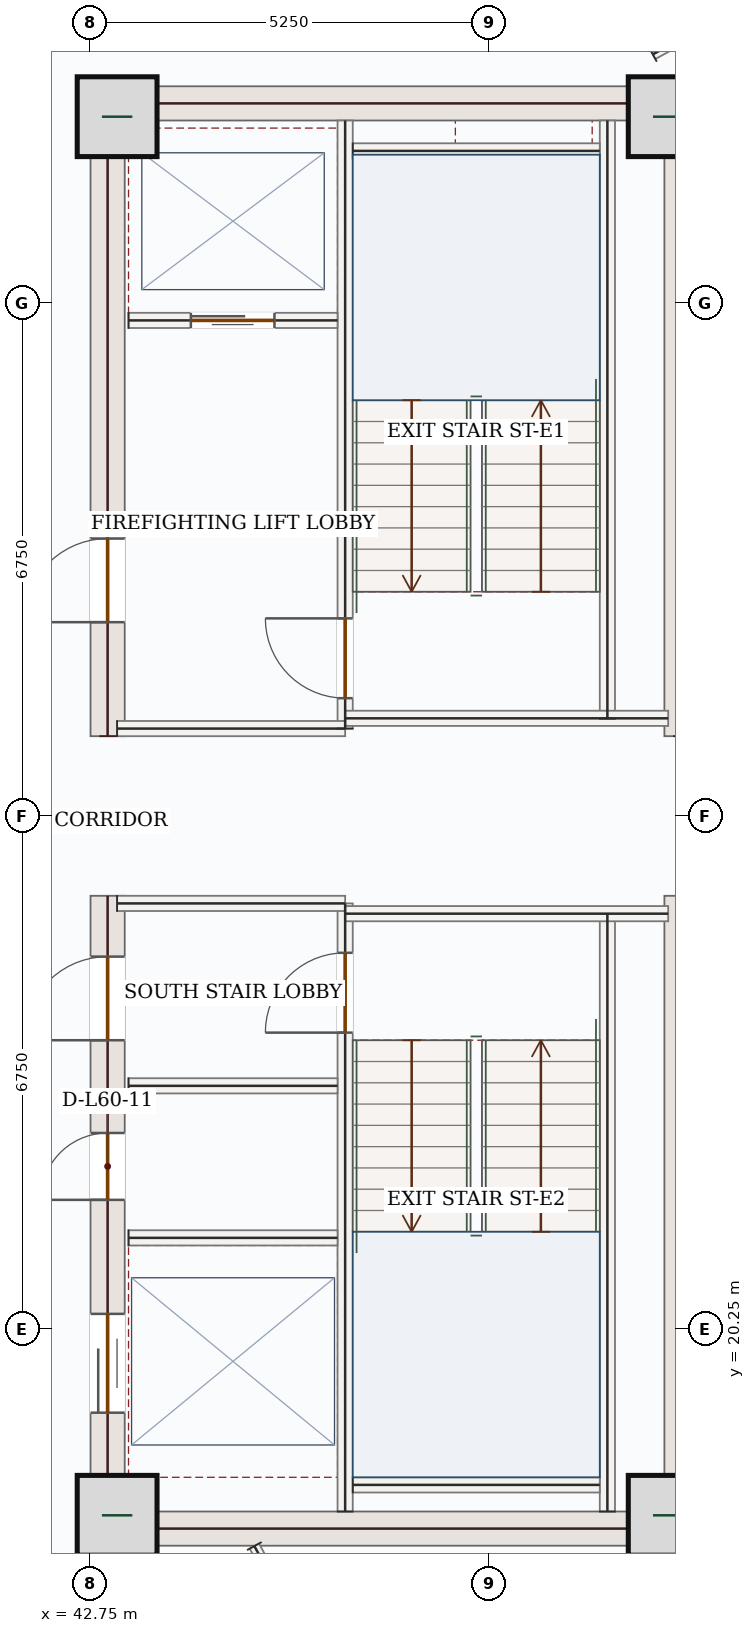
"""IFC4 building model, lengths in metres.
Left out: names, types, materials, properties, quantities, classifications, styles, units other than length and angle.
Written with IfcOpenShell. Run it as: python <this file> out.ifc"""

import sys

from ifc_helpers import new_model, si_unit, direction, frame, frame_2d, origin, origin_2d, place, context, subcontext, project, spatial, rectangle, extrude, source, transform, mapped, element, fill, save


model = new_model("IFC4")
c1 = context("Model", 3, precision=1e-05, world=origin(), true_north=direction((0.0, 1.0)))
c2 = subcontext(c1, "Body", "Model", "MODEL_VIEW")
j1 = project(units=[si_unit("LENGTHUNIT", "METRE"), si_unit("PLANEANGLEUNIT", "RADIAN")], contexts=[c1])
p1 = place(None, origin())
s1 = spatial("IfcSite", under=j1, at=p1, CompositionType="ELEMENT")
p2 = place(p1, origin())
s2 = spatial("IfcBuilding", under=s1, at=p2, CompositionType="ELEMENT")
p3 = place(p2, frame((0.0, 0.0, 254.1)))
s3 = spatial("IfcBuildingStorey", under=s2, at=p3, CompositionType="ELEMENT", Elevation=254.1)
p4 = place(p3, frame((42.975, 17.4, 0.0), z_axis=(0.0, 0.0, 1.0), x_axis=(0.0, 1.0, 0.0)))
e1 = element("IfcWall", 1, at=p4, inside=s3, PredefinedType="SHEAR", context=c2, shape_type="SweptSolid", body=[
    extrude(rectangle(XDim=8.55, YDim=0.45, at=frame_2d((4.275, 0.0))), origin(), (0.0, 0.0, 1.0), 3.5),
])
p5 = place(p4, frame((6.65, 0.0, 0.0)))
e2 = element("IfcOpeningElement", 2, at=p5, cuts=e1, PredefinedType="OPENING", context=c2, shape_type="SweptSolid", body=[
    extrude(rectangle(XDim=1.1, YDim=2.2, at=frame_2d((0.55, 1.1))), frame((0.0, 0.235, 0.0), z_axis=(0.0, -1.0, 0.0), x_axis=(1.0, 0.0, 0.0)), (0.0, 0.0, 1.0), 0.47),
])
p6 = place(p4, frame((1.75, 0.0, 0.0)))
e3 = element("IfcOpeningElement", 3, at=p6, cuts=e1, PredefinedType="OPENING", context=c2, shape_type="SweptSolid", body=[
    extrude(rectangle(XDim=1.3, YDim=2.2, at=frame_2d((0.65, 1.1))), frame((0.0, 0.235, 0.0), z_axis=(0.0, -1.0, 0.0), x_axis=(1.0, 0.0, 0.0)), (0.0, 0.0, 1.0), 0.47),
])
p7 = place(p4, frame((4.55, 0.0, 0.0)))
e4 = element("IfcOpeningElement", 4, at=p7, cuts=e1, PredefinedType="OPENING", context=c2, shape_type="SweptSolid", body=[
    extrude(rectangle(XDim=0.88, YDim=2.1, at=frame_2d((0.44, 1.05))), frame((0.0, 0.235, 0.0), z_axis=(0.0, -1.0, 0.0), x_axis=(1.0, 0.0, 0.0)), (0.0, 0.0, 1.0), 0.47),
])
p8 = place(p3, frame((42.975, 28.05, 0.0), z_axis=(0.0, 0.0, 1.0), x_axis=(0.0, 1.0, 0.0)))
e5 = element("IfcWall", 5, at=p8, inside=s3, PredefinedType="SHEAR", context=c2, shape_type="SweptSolid", body=[
    extrude(rectangle(XDim=8.55, YDim=0.45, at=frame_2d((4.275, 0.0))), origin(), (0.0, 0.0, 1.0), 3.5),
])
p9 = place(p8, frame((1.5, 0.0, 0.0)))
e6 = element("IfcOpeningElement", 6, at=p9, cuts=e5, PredefinedType="OPENING", context=c2, shape_type="SweptSolid", body=[
    extrude(rectangle(XDim=1.1, YDim=2.2, at=frame_2d((0.55, 1.1))), frame((0.0, 0.235, 0.0), z_axis=(0.0, -1.0, 0.0), x_axis=(1.0, 0.0, 0.0)), (0.0, 0.0, 1.0), 0.47),
])
m1 = source(origin(), c2, "Body", "SweptSolid", [
    extrude(rectangle(XDim=8.55, YDim=0.45, at=frame_2d((4.275, 0.0))), origin(), (0.0, 0.0, 1.0), 3.5),
])
for number, where, z_axis, x_axis in (
    (7, (50.525, 17.4, 0.0), (0.0, 0.0, 1.0), (0.0, 1.0, 0.0)),
    (8, (50.525, 28.05, 0.0), (0.0, 0.0, 1.0), (0.0, 1.0, 0.0)),
):
    element("IfcWall", number, at=place(p3, frame(where, z_axis=z_axis, x_axis=x_axis)), inside=s3, PredefinedType="SHEAR", context=c2, shape_type="MappedRepresentation", body=[
        mapped(m1, transform((0.0, 0.0, 0.0), x_axis=(1.0, 0.0, 0.0), y_axis=(0.0, 1.0, 0.0), z_axis=(0.0, 0.0, 1.0), scale=1.0)),
    ])
m2 = source(origin(), c2, "Body", "SweptSolid", [
    extrude(rectangle(XDim=7.1, YDim=0.45, at=frame_2d((3.55, 0.0))), origin(), (0.0, 0.0, 1.0), 3.5),
])
for number, where, z_axis, x_axis in (
    (9, (43.2, 17.625, 0.0), (0.0, 0.0, 1.0), (1.0, 0.0, 0.0)),
    (10, (43.2, 36.375, 0.0), (0.0, 0.0, 1.0), (1.0, 0.0, 0.0)),
):
    element("IfcWall", number, at=place(p3, frame(where, z_axis=z_axis, x_axis=x_axis)), inside=s3, PredefinedType="SHEAR", context=c2, shape_type="MappedRepresentation", body=[
        mapped(m2, transform((0.0, 0.0, 0.0), x_axis=(1.0, 0.0, 0.0), y_axis=(0.0, 1.0, 0.0), z_axis=(0.0, 0.0, 1.0), scale=1.0)),
    ])
m3 = source(origin(), c2, "Body", "SweptSolid", [
    extrude(rectangle(XDim=1.05, YDim=1.05, at=origin_2d()), origin(), (0.0, 0.0, 1.0), 3.75),
])
for number, where, z_axis, x_axis in (
    (11, (43.1, 17.8, 0.0), (0.0, 0.0, 1.0), (1.0, 0.0, 0.0)),
    (12, (50.35, 17.8, 0.0), (0.0, 0.0, 1.0), (1.0, 0.0, 0.0)),
    (13, (43.1, 36.2, 0.0), (0.0, 0.0, 1.0), (1.0, 0.0, 0.0)),
    (14, (50.35, 36.2, 0.0), (0.0, 0.0, 1.0), (1.0, 0.0, 0.0)),
):
    element("IfcColumn", number, at=place(p3, frame(where, z_axis=z_axis, x_axis=x_axis)), inside=s3, PredefinedType="COLUMN", context=c2, shape_type="MappedRepresentation", body=[
        mapped(m3, transform((0.0, 0.0, 0.0), x_axis=(1.0, 0.0, 0.0), y_axis=(0.0, 1.0, 0.0), z_axis=(0.0, 0.0, 1.0), scale=1.0)),
    ])
p10 = place(p3, frame((53.06, 18.458, 0.0), z_axis=(0.0, 0.0, 1.0), x_axis=(-0.707106781187, -0.707106781187, 0.0)))
e15 = element("IfcWall", 15, at=p10, inside=s3, PredefinedType="SOLIDWALL", context=c2, shape_type="SweptSolid", body=[
    extrude(rectangle(XDim=4.394, YDim=0.28, at=frame_2d((2.197, 0.0))), origin(), (0.0, 0.0, 1.0), 3.5),
])
p11 = place(p10, frame((1.447, 0.0, 0.85)))
e16 = element("IfcOpeningElement", 16, at=p11, cuts=e15, PredefinedType="OPENING", context=c2, shape_type="SweptSolid", body=[
    extrude(rectangle(XDim=1.5, YDim=1.5, at=frame_2d((0.75, 0.75))), frame((0.0, 0.15, 0.0), z_axis=(0.0, -1.0, 0.0), x_axis=(1.0, 0.0, 0.0)), (0.0, 0.0, 1.0), 0.3),
])
m4 = source(origin(), c2, "Body", "SweptSolid", [
    extrude(rectangle(XDim=7.87, YDim=0.2, at=frame_2d((3.935, 0.0))), origin(), (0.0, 0.0, 1.0), 3.5),
])
for number, where, z_axis, x_axis in (
    (17, (49.55, 17.85, 0.0), (0.0, 0.0, 1.0), (0.0, 1.0, 0.0)),
    (18, (49.55, 28.28, 0.0), (0.0, 0.0, 1.0), (0.0, 1.0, 0.0)),
):
    element("IfcWall", number, at=place(p3, frame(where, z_axis=z_axis, x_axis=x_axis)), inside=s3, PredefinedType="SOLIDWALL", context=c2, shape_type="MappedRepresentation", body=[
        mapped(m4, transform((0.0, 0.0, 0.0), x_axis=(1.0, 0.0, 0.0), y_axis=(0.0, 1.0, 0.0), z_axis=(0.0, 0.0, 1.0), scale=1.0)),
    ])
p12 = place(p3, frame((46.1, 17.85, 0.0), z_axis=(0.0, 0.0, 1.0), x_axis=(0.0, 1.0, 0.0)))
e19 = element("IfcWall", 19, at=p12, inside=s3, PredefinedType="SOLIDWALL", context=c2, shape_type="SweptSolid", body=[
    extrude(rectangle(XDim=8.0, YDim=0.2, at=frame_2d((4.0, 0.0))), origin(), (0.0, 0.0, 1.0), 3.5),
])
p13 = place(p12, frame((6.3, 0.0, 0.0)))
e20 = element("IfcOpeningElement", 20, at=p13, cuts=e19, PredefinedType="OPENING", context=c2, shape_type="SweptSolid", body=[
    extrude(rectangle(XDim=1.05, YDim=2.15, at=frame_2d((0.525, 1.075))), frame((0.0, 0.11, 0.0), z_axis=(0.0, -1.0, 0.0), x_axis=(1.0, 0.0, 0.0)), (0.0, 0.0, 1.0), 0.22),
])
p14 = place(p3, frame((46.1, 28.15, 0.0), z_axis=(0.0, 0.0, 1.0), x_axis=(0.0, 1.0, 0.0)))
e21 = element("IfcWall", 21, at=p14, inside=s3, PredefinedType="SOLIDWALL", context=c2, shape_type="SweptSolid", body=[
    extrude(rectangle(XDim=8.0, YDim=0.2, at=frame_2d((4.0, 0.0))), origin(), (0.0, 0.0, 1.0), 3.5),
])
p15 = place(p14, frame((0.4, 0.0, 0.0)))
e22 = element("IfcOpeningElement", 22, at=p15, cuts=e21, PredefinedType="OPENING", context=c2, shape_type="SweptSolid", body=[
    extrude(rectangle(XDim=1.05, YDim=2.15, at=frame_2d((0.525, 1.075))), frame((0.0, 0.11, 0.0), z_axis=(0.0, -1.0, 0.0), x_axis=(1.0, 0.0, 0.0)), (0.0, 0.0, 1.0), 0.22),
])
m5 = source(origin(), c2, "Body", "SweptSolid", [
    extrude(rectangle(XDim=3.0, YDim=0.2, at=frame_2d((1.5, 0.0))), origin(), (0.0, 0.0, 1.0), 3.5),
])
p16 = place(p3, frame((43.1, 25.85, 0.0), z_axis=(0.0, 0.0, 1.0), x_axis=(1.0, 0.0, 0.0)))
e23 = element("IfcWall", 23, at=p16, inside=s3, PredefinedType="SOLIDWALL", context=c2, shape_type="MappedRepresentation", body=[
    mapped(m5, transform((0.0, 0.0, 0.0), x_axis=(1.0, 0.0, 0.0), y_axis=(0.0, 1.0, 0.0), z_axis=(0.0, 0.0, 1.0), scale=1.0)),
])
m6 = source(origin(), c2, "Body", "SweptSolid", [
    extrude(rectangle(XDim=4.25, YDim=0.2, at=frame_2d((2.125, 0.0))), origin(), (0.0, 0.0, 1.0), 3.5),
])
p17 = place(p3, frame((46.1, 25.715, 0.0), z_axis=(0.0, 0.0, 1.0), x_axis=(1.0, 0.0, 0.0)))
e24 = element("IfcWall", 24, at=p17, inside=s3, PredefinedType="SOLIDWALL", context=c2, shape_type="MappedRepresentation", body=[
    mapped(m6, transform((0.0, 0.0, 0.0), x_axis=(1.0, 0.0, 0.0), y_axis=(0.0, 1.0, 0.0), z_axis=(0.0, 0.0, 1.0), scale=1.0)),
])
p18 = place(p3, frame((43.1, 28.15, 0.0), z_axis=(0.0, 0.0, 1.0), x_axis=(1.0, 0.0, 0.0)))
e25 = element("IfcWall", 25, at=p18, inside=s3, PredefinedType="SOLIDWALL", context=c2, shape_type="MappedRepresentation", body=[
    mapped(m5, transform((0.0, 0.0, 0.0), x_axis=(1.0, 0.0, 0.0), y_axis=(0.0, 1.0, 0.0), z_axis=(0.0, 0.0, 1.0), scale=1.0)),
])
p19 = place(p3, frame((46.1, 28.285, 0.0), z_axis=(0.0, 0.0, 1.0), x_axis=(1.0, 0.0, 0.0)))
e26 = element("IfcWall", 26, at=p19, inside=s3, PredefinedType="SOLIDWALL", context=c2, shape_type="MappedRepresentation", body=[
    mapped(m6, transform((0.0, 0.0, 0.0), x_axis=(1.0, 0.0, 0.0), y_axis=(0.0, 1.0, 0.0), z_axis=(0.0, 0.0, 1.0), scale=1.0)),
])
m7 = source(origin(), c2, "Body", "SweptSolid", [
    extrude(rectangle(XDim=3.25, YDim=0.2, at=frame_2d((1.625, 0.0))), origin(), (0.0, 0.0, 1.0), 3.5),
])
for number, where, z_axis, x_axis in (
    (27, (46.2, 35.75, 0.0), (0.0, 0.0, 1.0), (1.0, 0.0, 0.0)),
    (28, (46.2, 18.2, 0.0), (0.0, 0.0, 1.0), (1.0, 0.0, 0.0)),
):
    element("IfcWall", number, at=place(p3, frame(where, z_axis=z_axis, x_axis=x_axis)), inside=s3, PredefinedType="SOLIDWALL", context=c2, shape_type="MappedRepresentation", body=[
        mapped(m7, transform((0.0, 0.0, 0.0), x_axis=(1.0, 0.0, 0.0), y_axis=(0.0, 1.0, 0.0), z_axis=(0.0, 0.0, 1.0), scale=1.0)),
    ])
p20 = place(p3, frame((43.25, 33.52, 0.0), z_axis=(0.0, 0.0, 1.0), x_axis=(1.0, 0.0, 0.0)))
e29 = element("IfcWall", 29, at=p20, inside=s3, PredefinedType="SOLIDWALL", context=c2, shape_type="SweptSolid", body=[
    extrude(rectangle(XDim=2.75, YDim=0.2, at=frame_2d((1.375, 0.0))), origin(), (0.0, 0.0, 1.0), 3.5),
])
p21 = place(p20, frame((0.82, 0.0, 0.0)))
e30 = element("IfcOpeningElement", 30, at=p21, cuts=e29, PredefinedType="OPENING", context=c2, shape_type="SweptSolid", body=[
    extrude(rectangle(XDim=1.1, YDim=2.15, at=frame_2d((0.55, 1.075))), frame((0.0, 0.11, 0.0), z_axis=(0.0, -1.0, 0.0), x_axis=(1.0, 0.0, 0.0)), (0.0, 0.0, 1.0), 0.22),
])
m8 = source(origin(), c2, "Body", "SweptSolid", [
    extrude(rectangle(XDim=2.75, YDim=0.2, at=frame_2d((1.375, 0.0))), origin(), (0.0, 0.0, 1.0), 3.5),
])
for number, where, z_axis, x_axis in (
    (31, (43.25, 23.45, 0.0), (0.0, 0.0, 1.0), (1.0, 0.0, 0.0)),
    (32, (43.25, 21.45, 0.0), (0.0, 0.0, 1.0), (1.0, 0.0, 0.0)),
):
    element("IfcWall", number, at=place(p3, frame(where, z_axis=z_axis, x_axis=x_axis)), inside=s3, PredefinedType="SOLIDWALL", context=c2, shape_type="MappedRepresentation", body=[
        mapped(m8, transform((0.0, 0.0, 0.0), x_axis=(1.0, 0.0, 0.0), y_axis=(0.0, 1.0, 0.0), z_axis=(0.0, 0.0, 1.0), scale=1.0)),
    ])
m9 = source(origin(), c2, "Body", "SweptSolid", [
    extrude(rectangle(XDim=4.695, YDim=0.14, at=frame_2d((2.348, 0.0))), origin(), (0.0, 0.0, 1.0), 3.5),
])
p22 = place(p3, frame((50.148, 37.02, 0.0), z_axis=(0.0, 0.0, 1.0), x_axis=(0.877559526902, 0.479467701461, 0.0)))
e33 = element("IfcWall", 33, at=p22, inside=s3, PredefinedType="PARTITIONING", context=c2, shape_type="MappedRepresentation", body=[
    mapped(m9, transform((0.0, 0.0, 0.0), x_axis=(1.0, 0.0, 0.0), y_axis=(0.0, 1.0, 0.0), z_axis=(0.0, 0.0, 1.0), scale=1.0)),
])
p23 = place(p3, frame((44.906, 17.395, 0.0), z_axis=(0.0, 0.0, 1.0), x_axis=(0.479449534835, -0.877569452264, 0.0)))
e34 = element("IfcWall", 34, at=p23, inside=s3, PredefinedType="PARTITIONING", context=c2, shape_type="SweptSolid", body=[
    extrude(rectangle(XDim=8.216, YDim=0.14, at=frame_2d((4.108, 0.0))), origin(), (0.0, 0.0, 1.0), 3.5),
])
p24 = place(p23, frame((1.599, 0.0, 0.0)))
e35 = element("IfcOpeningElement", 35, at=p24, cuts=e34, PredefinedType="OPENING", context=c2, shape_type="SweptSolid", body=[
    extrude(rectangle(XDim=0.95, YDim=2.15, at=frame_2d((0.475, 1.075))), frame((0.0, 0.08, 0.0), z_axis=(0.0, -1.0, 0.0), x_axis=(1.0, 0.0, 0.0)), (0.0, 0.0, 1.0), 0.16),
])
m10 = source(origin(), c2, "Body", "SweptSolid", [
    extrude(rectangle(XDim=1.05, YDim=2.15, at=frame_2d((0.525, 1.075))), frame((0.0, 0.025, 0.0), z_axis=(0.0, -1.0, 0.0), x_axis=(1.0, 0.0, 0.0)), (0.0, 0.0, 1.0), 0.05),
])
p25 = place(p15, origin())
e36 = element("IfcDoor", 36, at=p25, inside=s3, OperationType="SINGLE_SWING_RIGHT", PredefinedType="DOOR", context=c2, shape_type="MappedRepresentation", body=[
    mapped(m10, transform((0.0, 0.0, 0.0), x_axis=(1.0, 0.0, 0.0), y_axis=(0.0, 1.0, 0.0), z_axis=(0.0, 0.0, 1.0), scale=1.0)),
])
fill(e22, e36)
p26 = place(p13, origin())
e37 = element("IfcDoor", 37, at=p26, inside=s3, OperationType="SINGLE_SWING_LEFT", PredefinedType="DOOR", context=c2, shape_type="MappedRepresentation", body=[
    mapped(m10, transform((0.0, 0.0, 0.0), x_axis=(1.0, 0.0, 0.0), y_axis=(0.0, 1.0, 0.0), z_axis=(0.0, 0.0, 1.0), scale=1.0)),
])
fill(e20, e37)
m11 = source(origin(), c2, "Body", "SweptSolid", [
    extrude(rectangle(XDim=1.1, YDim=2.15, at=frame_2d((0.55, 1.075))), frame((0.0, 0.025, 0.0), z_axis=(0.0, -1.0, 0.0), x_axis=(1.0, 0.0, 0.0)), (0.0, 0.0, 1.0), 0.05),
])
p27 = place(p21, origin())
e38 = element("IfcDoor", 38, at=p27, inside=s3, OperationType="DOUBLE_DOOR_SLIDING", PredefinedType="DOOR", context=c2, shape_type="MappedRepresentation", body=[
    mapped(m11, transform((0.0, 0.0, 0.0), x_axis=(1.0, 0.0, 0.0), y_axis=(0.0, 1.0, 0.0), z_axis=(0.0, 0.0, 1.0), scale=1.0)),
])
fill(e30, e38)
m12 = source(origin(), c2, "Body", "SweptSolid", [
    extrude(rectangle(XDim=1.1, YDim=2.2, at=frame_2d((0.55, 1.1))), frame((0.0, 0.025, 0.0), z_axis=(0.0, -1.0, 0.0), x_axis=(1.0, 0.0, 0.0)), (0.0, 0.0, 1.0), 0.05),
])
p28 = place(p9, origin())
e39 = element("IfcDoor", 39, at=p28, inside=s3, OperationType="SINGLE_SWING_LEFT", PredefinedType="DOOR", context=c2, shape_type="MappedRepresentation", body=[
    mapped(m12, transform((0.0, 0.0, 0.0), x_axis=(1.0, 0.0, 0.0), y_axis=(0.0, 1.0, 0.0), z_axis=(0.0, 0.0, 1.0), scale=1.0)),
])
fill(e6, e39)
p29 = place(p5, origin())
e40 = element("IfcDoor", 40, at=p29, inside=s3, OperationType="SINGLE_SWING_LEFT", PredefinedType="DOOR", context=c2, shape_type="MappedRepresentation", body=[
    mapped(m12, transform((0.0, 0.0, 0.0), x_axis=(1.0, 0.0, 0.0), y_axis=(0.0, 1.0, 0.0), z_axis=(0.0, 0.0, 1.0), scale=1.0)),
])
fill(e2, e40)
m13 = source(origin(), c2, "Body", "SweptSolid", [
    extrude(rectangle(XDim=1.3, YDim=2.2, at=frame_2d((0.65, 1.1))), frame((0.0, 0.025, 0.0), z_axis=(0.0, -1.0, 0.0), x_axis=(1.0, 0.0, 0.0)), (0.0, 0.0, 1.0), 0.05),
])
p30 = place(p6, origin())
e41 = element("IfcDoor", 41, at=p30, inside=s3, OperationType="DOUBLE_DOOR_SLIDING", PredefinedType="DOOR", context=c2, shape_type="MappedRepresentation", body=[
    mapped(m13, transform((0.0, 0.0, 0.0), x_axis=(1.0, 0.0, 0.0), y_axis=(0.0, 1.0, 0.0), z_axis=(0.0, 0.0, 1.0), scale=1.0)),
])
fill(e3, e41)
m14 = source(origin(), c2, "Body", "SweptSolid", [
    extrude(rectangle(XDim=0.88, YDim=2.1, at=frame_2d((0.44, 1.05))), frame((0.0, 0.025, 0.0), z_axis=(0.0, -1.0, 0.0), x_axis=(1.0, 0.0, 0.0)), (0.0, 0.0, 1.0), 0.05),
])
p31 = place(p7, origin())
e42 = element("IfcDoor", 42, at=p31, inside=s3, OperationType="SINGLE_SWING_LEFT", PredefinedType="DOOR", context=c2, shape_type="MappedRepresentation", body=[
    mapped(m14, transform((0.0, 0.0, 0.0), x_axis=(1.0, 0.0, 0.0), y_axis=(0.0, 1.0, 0.0), z_axis=(0.0, 0.0, 1.0), scale=1.0)),
])
fill(e4, e42)
save(model, sys.argv[1])
